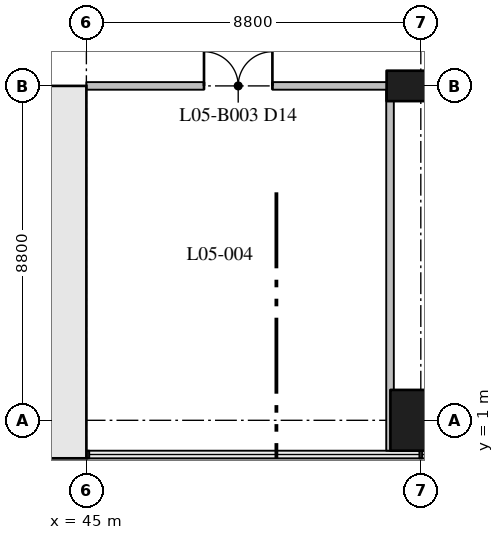
"""IFC4 building model, lengths in metres.
Left out: names, types, materials, properties, quantities, classifications, styles, units other than length and angle.
Written with IfcOpenShell. Run it as: python <this file> out.ifc"""

import sys

from ifc_helpers import new_model, si_unit, direction, frame, frame_2d, origin, origin_2d, place, context, subcontext, project, spatial, rectangle, extrude, element, fill, save


model = new_model("IFC4")
c1 = context("Model", 3, precision=1e-05, world=origin(), true_north=direction((0.0, 1.0)))
c2 = subcontext(c1, "Body", "Model", "MODEL_VIEW")
j1 = project(units=[si_unit("LENGTHUNIT", "METRE"), si_unit("PLANEANGLEUNIT", "RADIAN")], contexts=[c1])
p1 = place(None, origin())
s1 = spatial("IfcSite", under=j1, at=p1, CompositionType="ELEMENT")
p2 = place(p1, origin())
s2 = spatial("IfcBuilding", under=s1, at=p2, CompositionType="ELEMENT")
p3 = place(p2, frame((0.0, 0.0, 29.0)))
s3 = spatial("IfcBuildingStorey", under=s2, at=p3, CompositionType="ELEMENT", Elevation=29.0)
p4 = place(p3, frame((53.8, 1.0, 0.0), z_axis=(0.0, 0.0, 1.0), x_axis=(1.0, 0.0, 0.0)))
e1 = element("IfcColumn", 1, at=p4, inside=s3, PredefinedType="COLUMN", context=c2, shape_type="SweptSolid", body=[
    extrude(rectangle(XDim=1.6, YDim=1.6, at=origin_2d()), origin(), (0.0, 0.0, 1.0), 5.0),
])
p5 = place(p3, frame((53.8, 9.8, 0.0), z_axis=(0.0, 0.0, 1.0), x_axis=(1.0, 0.0, 0.0)))
e2 = element("IfcColumn", 2, at=p5, inside=s3, PredefinedType="COLUMN", context=c2, shape_type="SweptSolid", body=[
    extrude(rectangle(XDim=1.8, YDim=0.8, at=origin_2d()), origin(), (0.0, 0.0, 1.0), 5.0),
])
p6 = place(p3, frame((9.8, 0.6, 0.0), z_axis=(0.0, 0.0, 1.0), x_axis=(1.0, 0.0, 0.0)))
e3 = element("IfcWall", 3, at=p6, inside=s3, PredefinedType="SHEAR", context=c2, shape_type="SweptSolid", body=[
    extrude(rectangle(XDim=35.2, YDim=1.2, at=frame_2d((17.6, 0.0))), origin(), (0.0, 0.0, 1.0), 5.0),
])
p7 = place(p3, frame((44.4, 1.2, 0.0), z_axis=(0.0, 0.0, 1.0), x_axis=(0.0, 1.0, 0.0)))
e4 = element("IfcWall", 4, at=p7, inside=s3, PredefinedType="SHEAR", context=c2, shape_type="SweptSolid", body=[
    extrude(rectangle(XDim=8.6, YDim=1.2, at=frame_2d((4.3, 0.0))), origin(), (0.0, 0.0, 1.0), 5.0),
])
p8 = place(p3, frame((40.7, 9.6, 0.0), z_axis=(0.0, 0.0, 1.0), x_axis=(1.0, 0.0, 0.0)))
e5 = element("IfcWall", 5, at=p8, inside=s3, PredefinedType="SHEAR", context=c2, shape_type="SweptSolid", body=[
    extrude(rectangle(XDim=4.3, YDim=0.4, at=frame_2d((2.15, 0.0))), origin(), (0.0, 0.0, 1.0), 5.0),
])
p9 = place(p8, frame((1.05, 0.0, 0.0)))
e6 = element("IfcOpeningElement", 6, at=p9, cuts=e5, PredefinedType="OPENING", context=c2, shape_type="SweptSolid", body=[
    extrude(rectangle(XDim=1.2, YDim=2.1, at=frame_2d((0.6, 1.05))), frame((0.0, 0.21, 0.0), z_axis=(0.0, -1.0, 0.0), x_axis=(1.0, 0.0, 0.0)), (0.0, 0.0, 1.0), 0.42),
])
p10 = place(p3, frame((45.0, 9.8, 0.0), z_axis=(0.0, 0.0, 1.0), x_axis=(1.0, 0.0, 0.0)))
e7 = element("IfcWall", 7, at=p10, inside=s3, PredefinedType="PARTITIONING", context=c2, shape_type="SweptSolid", body=[
    extrude(rectangle(XDim=19.4, YDim=0.2, at=frame_2d((9.7, 0.0))), origin(), (0.0, 0.0, 1.0), 4.55),
])
p11 = place(p10, frame((3.095, 0.0, 0.0)))
e8 = element("IfcOpeningElement", 8, at=p11, cuts=e7, PredefinedType="OPENING", context=c2, shape_type="SweptSolid", body=[
    extrude(rectangle(XDim=1.8, YDim=2.4, at=frame_2d((0.9, 1.2))), frame((0.0, 0.11, 0.0), z_axis=(0.0, -1.0, 0.0), x_axis=(1.0, 0.0, 0.0)), (0.0, 0.0, 1.0), 0.22),
])
p12 = place(p10, frame((12.795, 0.0, 0.0)))
e9 = element("IfcOpeningElement", 9, at=p12, cuts=e7, PredefinedType="OPENING", context=c2, shape_type="SweptSolid", body=[
    extrude(rectangle(XDim=1.8, YDim=2.4, at=frame_2d((0.9, 1.2))), frame((0.0, 0.11, 0.0), z_axis=(0.0, -1.0, 0.0), x_axis=(1.0, 0.0, 0.0)), (0.0, 0.0, 1.0), 0.22),
])
p13 = place(p3, frame((52.99, 0.2, 0.0), z_axis=(0.0, 0.0, 1.0), x_axis=(0.0, 1.0, 0.0)))
e10 = element("IfcWall", 10, at=p13, inside=s3, PredefinedType="PARTITIONING", context=c2, shape_type="SweptSolid", body=[
    extrude(rectangle(XDim=9.5, YDim=0.2, at=frame_2d((4.75, 0.0))), origin(), (0.0, 0.0, 1.0), 4.55),
])
p14 = place(p11, origin())
e11 = element("IfcDoor", 11, at=p14, inside=s3, OperationType="DOUBLE_DOOR_SINGLE_SWING", PredefinedType="DOOR", context=c2, shape_type="SweptSolid", body=[
    extrude(rectangle(XDim=1.8, YDim=2.4, at=frame_2d((0.9, 1.2))), frame((0.0, 0.025, 0.0), z_axis=(0.0, -1.0, 0.0), x_axis=(1.0, 0.0, 0.0)), (0.0, 0.0, 1.0), 0.05),
])
fill(e8, e11)
save(model, sys.argv[1])
